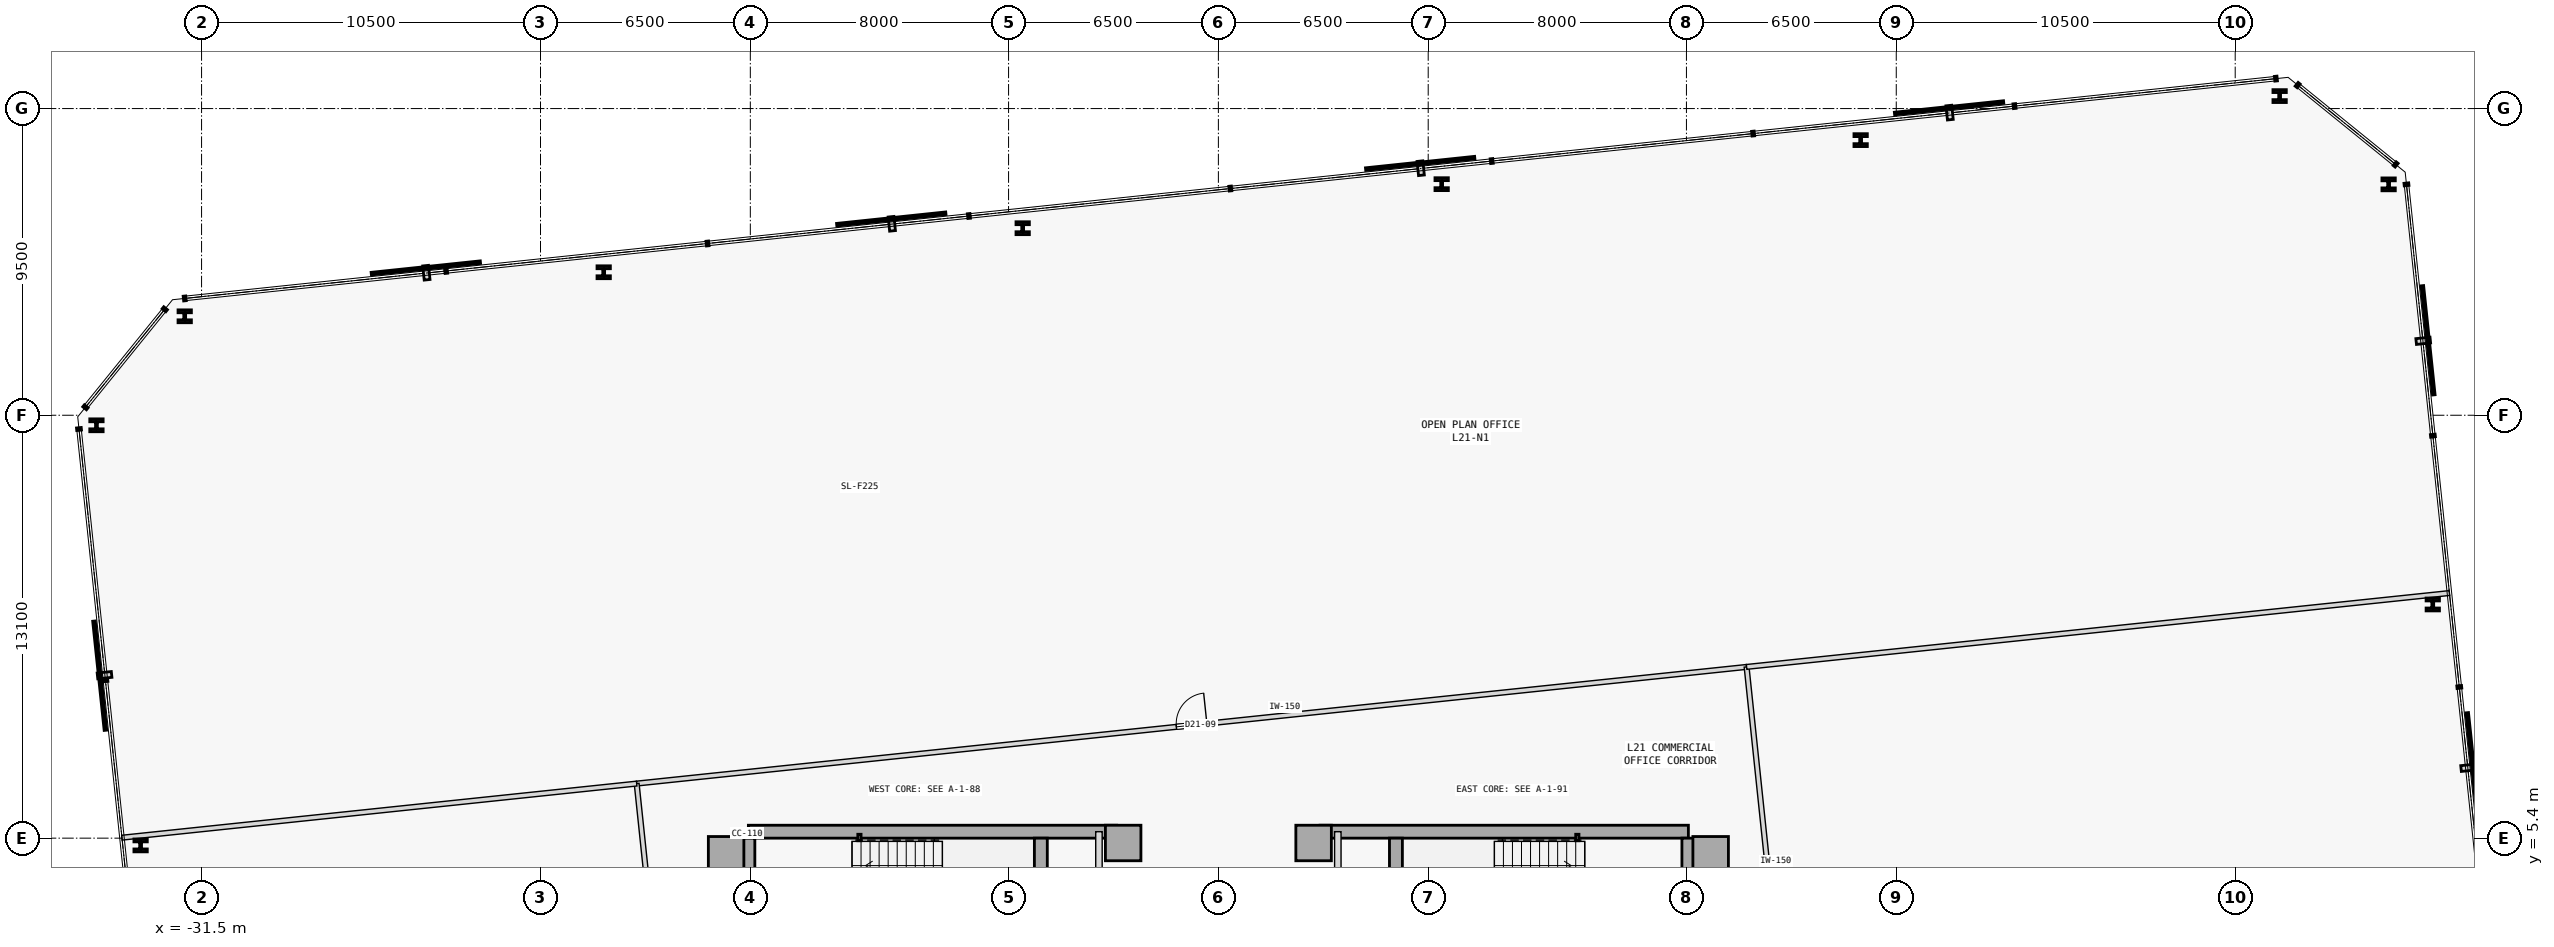
"""IFC4 building model, lengths in metres.
Left out: names, types, materials, properties, quantities, classifications, styles, units other than length and angle.
Written with IfcOpenShell. Run it as: python <this file> out.ifc"""

import sys

from ifc_helpers import new_model, si_unit, direction, frame, frame_2d, origin, origin_2d, place, context, subcontext, project, spatial, rectangle, hollow_rectangle, i_section, extrude, element, fill, save


model = new_model("IFC4")
c1 = context("Model", 3, precision=1e-05, world=origin(), true_north=direction((0.0, 1.0)))
c2 = subcontext(c1, "Body", "Model", "MODEL_VIEW")
j1 = project(units=[si_unit("LENGTHUNIT", "METRE"), si_unit("PLANEANGLEUNIT", "RADIAN")], contexts=[c1])
p1 = place(None, origin())
s1 = spatial("IfcSite", under=j1, at=p1, CompositionType="ELEMENT")
p2 = place(p1, origin())
s2 = spatial("IfcBuilding", under=s1, at=p2, CompositionType="ELEMENT")
p3 = place(p2, frame((0.0, 0.0, 87.4)))
s3 = spatial("IfcBuildingStorey", under=s2, at=p3, CompositionType="ELEMENT", Elevation=87.4)
for number, where, z_axis, x_axis in (
    (1, (-15.25, 4.9, 0.0), (0.0, 0.0, 1.0), (1.0, 0.0, 0.0)),
    (2, (-2.95, 5.25, 0.0), (0.0, 0.0, 1.0), (1.0, 0.0, 0.0)),
    (3, (15.25, 4.9, 0.0), (0.0, 0.0, 1.0), (1.0, 0.0, 0.0)),
    (4, (2.95, 5.25, 0.0), (0.0, 0.0, 1.0), (1.0, 0.0, 0.0)),
):
    element("IfcColumn", number, at=place(p3, frame(where, z_axis=z_axis, x_axis=x_axis)), inside=s3, PredefinedType="COLUMN", context=c2, shape_type="SweptSolid", body=[
        extrude(rectangle(XDim=1.1, YDim=1.1, at=origin_2d()), origin(), (0.0, 0.0, 1.0), 3.7),
    ])
p4 = place(p3, frame((-14.56, 5.6, 0.0), z_axis=(0.0, 0.0, 1.0), x_axis=(1.0, 0.0, 0.0)))
e5 = element("IfcWall", 5, at=p4, inside=s3, PredefinedType="SHEAR", context=c2, shape_type="SweptSolid", body=[
    extrude(rectangle(XDim=11.41, YDim=0.4, at=frame_2d((5.705, 0.0))), origin(), (0.0, 0.0, 1.0), 3.475),
])
p5 = place(p3, frame((-14.56, -5.4, 0.0), z_axis=(0.0, 0.0, 1.0), x_axis=(0.0, 1.0, 0.0)))
e6 = element("IfcWall", 6, at=p5, inside=s3, PredefinedType="SHEAR", context=c2, shape_type="SweptSolid", body=[
    extrude(rectangle(XDim=10.8, YDim=0.4, at=frame_2d((5.4, 0.0))), origin(), (0.0, 0.0, 1.0), 3.475),
])
p6 = place(p3, frame((-5.5, 2.15, 0.0), z_axis=(0.0, 0.0, 1.0), x_axis=(0.0, 1.0, 0.0)))
e7 = element("IfcWall", 7, at=p6, inside=s3, PredefinedType="SHEAR", context=c2, shape_type="SweptSolid", body=[
    extrude(rectangle(XDim=3.25, YDim=0.4, at=frame_2d((1.625, 0.0))), origin(), (0.0, 0.0, 1.0), 3.475),
])
p7 = place(p3, frame((3.15, 5.6, 0.0), z_axis=(0.0, 0.0, 1.0), x_axis=(1.0, 0.0, 0.0)))
e8 = element("IfcWall", 8, at=p7, inside=s3, PredefinedType="SHEAR", context=c2, shape_type="SweptSolid", body=[
    extrude(rectangle(XDim=11.41, YDim=0.4, at=frame_2d((5.705, 0.0))), origin(), (0.0, 0.0, 1.0), 3.475),
])
p8 = place(p3, frame((14.56, -5.4, 0.0), z_axis=(0.0, 0.0, 1.0), x_axis=(0.0, 1.0, 0.0)))
e9 = element("IfcWall", 9, at=p8, inside=s3, PredefinedType="SHEAR", context=c2, shape_type="SweptSolid", body=[
    extrude(rectangle(XDim=10.8, YDim=0.4, at=frame_2d((5.4, 0.0))), origin(), (0.0, 0.0, 1.0), 3.475),
])
p9 = place(p3, frame((5.5, 2.15, 0.0), z_axis=(0.0, 0.0, 1.0), x_axis=(0.0, 1.0, 0.0)))
e10 = element("IfcWall", 10, at=p9, inside=s3, PredefinedType="SHEAR", context=c2, shape_type="SweptSolid", body=[
    extrude(rectangle(XDim=3.25, YDim=0.4, at=frame_2d((1.625, 0.0))), origin(), (0.0, 0.0, 1.0), 3.475),
])
for number, where, z_axis, x_axis in (
    (11, (-11.12, 5.42, 0.0), (0.0, 0.0, 1.0), (1.0, 0.0, 0.0)),
    (12, (11.12, 5.42, 0.0), (0.0, 0.0, 1.0), (1.0, 0.0, 0.0)),
):
    element("IfcColumn", number, at=place(p3, frame(where, z_axis=z_axis, x_axis=x_axis)), inside=s3, PredefinedType="COLUMN", context=c2, shape_type="SweptSolid", body=[
        extrude(hollow_rectangle(XDim=0.1, YDim=0.2, WallThickness=0.008, at=origin_2d()), origin(), (0.0, 0.0, 1.0), 3.7),
    ])
for number, where, z_axis, x_axis in (
    (13, (37.621, 12.638, 0.0), (0.0, 0.0, 1.0), (1.0, 0.0, 0.0)),
    (14, (36.253, 25.652, 0.0), (0.0, 0.0, 1.0), (1.0, 0.0, 0.0)),
    (15, (32.876, 28.386, 0.0), (0.0, 0.0, 1.0), (1.0, 0.0, 0.0)),
    (16, (19.897, 27.022, 0.0), (0.0, 0.0, 1.0), (1.0, 0.0, 0.0)),
    (17, (6.917, 25.658, 0.0), (0.0, 0.0, 1.0), (1.0, 0.0, 0.0)),
    (18, (-6.062, 24.293, 0.0), (0.0, 0.0, 1.0), (1.0, 0.0, 0.0)),
    (19, (-19.042, 22.929, 0.0), (0.0, 0.0, 1.0), (1.0, 0.0, 0.0)),
    (20, (-32.022, 21.565, 0.0), (0.0, 0.0, 1.0), (1.0, 0.0, 0.0)),
    (21, (-34.756, 18.189, 0.0), (0.0, 0.0, 1.0), (1.0, 0.0, 0.0)),
    (22, (-33.388, 5.175, 0.0), (0.0, 0.0, 1.0), (1.0, 0.0, 0.0)),
):
    element("IfcColumn", number, at=place(p3, frame(where, z_axis=z_axis, x_axis=x_axis)), inside=s3, PredefinedType="COLUMN", context=c2, shape_type="SweptSolid", body=[
        extrude(i_section(OverallWidth=0.413, OverallDepth=0.398, WebThickness=0.056, FlangeThickness=0.089, FilletRadius=0.015, at=origin_2d()), origin(), (0.0, 0.0, 1.0), 3.7),
    ])
p10 = place(p3, frame((-3.7, -1.15, 0.0), z_axis=(0.0, 0.0, 1.0), x_axis=(0.0, 1.0, 0.0)))
e23 = element("IfcWall", 23, at=p10, inside=s3, PredefinedType="STANDARD", context=c2, shape_type="SweptSolid", body=[
    extrude(rectangle(XDim=6.75, YDim=0.2, at=frame_2d((3.375, 0.0))), origin(), (0.0, 0.0, 1.0), 3.475),
])
p11 = place(p10, frame((0.35, 0.0, 0.0)))
e24 = element("IfcOpeningElement", 24, at=p11, cuts=e23, PredefinedType="OPENING", context=c2, shape_type="SweptSolid", body=[
    extrude(rectangle(XDim=0.88, YDim=2.15, at=frame_2d((0.44, 1.075))), frame((0.0, 0.11, 0.0), z_axis=(0.0, -1.0, 0.0), x_axis=(1.0, 0.0, 0.0)), (0.0, 0.0, 1.0), 0.22),
])
p12 = place(p10, frame((2.55, 0.0, 0.0)))
e25 = element("IfcOpeningElement", 25, at=p12, cuts=e23, PredefinedType="OPENING", context=c2, shape_type="SweptSolid", body=[
    extrude(rectangle(XDim=0.92, YDim=2.15, at=frame_2d((0.46, 1.075))), frame((0.0, 0.11, 0.0), z_axis=(0.0, -1.0, 0.0), x_axis=(1.0, 0.0, 0.0)), (0.0, 0.0, 1.0), 0.22),
])
p13 = place(p10, frame((4.22, 0.0, 0.0)))
e26 = element("IfcOpeningElement", 26, at=p13, cuts=e23, PredefinedType="OPENING", context=c2, shape_type="SweptSolid", body=[
    extrude(rectangle(XDim=0.88, YDim=2.15, at=frame_2d((0.44, 1.075))), frame((0.0, 0.11, 0.0), z_axis=(0.0, -1.0, 0.0), x_axis=(1.0, 0.0, 0.0)), (0.0, 0.0, 1.0), 0.22),
])
p14 = place(p3, frame((3.7, -1.15, 0.0), z_axis=(0.0, 0.0, 1.0), x_axis=(0.0, 1.0, 0.0)))
e27 = element("IfcWall", 27, at=p14, inside=s3, PredefinedType="STANDARD", context=c2, shape_type="SweptSolid", body=[
    extrude(rectangle(XDim=6.75, YDim=0.2, at=frame_2d((3.375, 0.0))), origin(), (0.0, 0.0, 1.0), 3.475),
])
p15 = place(p14, frame((3.6, 0.0, 0.0)))
e28 = element("IfcOpeningElement", 28, at=p15, cuts=e27, PredefinedType="OPENING", context=c2, shape_type="SweptSolid", body=[
    extrude(rectangle(XDim=0.92, YDim=2.15, at=frame_2d((0.46, 1.075))), frame((0.0, 0.11, 0.0), z_axis=(0.0, -1.0, 0.0), x_axis=(1.0, 0.0, 0.0)), (0.0, 0.0, 1.0), 0.22),
])
p16 = place(p14, frame((0.85, 0.0, 0.0)))
e29 = element("IfcOpeningElement", 29, at=p16, cuts=e27, PredefinedType="OPENING", context=c2, shape_type="SweptSolid", body=[
    extrude(rectangle(XDim=0.9, YDim=2.15, at=frame_2d((0.45, 1.075))), frame((0.0, 0.11, 0.0), z_axis=(0.0, -1.0, 0.0), x_axis=(1.0, 0.0, 0.0)), (0.0, 0.0, 1.0), 0.22),
])
p17 = place(p3, frame((-18.021, 7.09, 0.0), z_axis=(0.0, 0.0, 1.0), x_axis=(0.994522464549, 0.104523047737, 0.0)))
e30 = element("IfcWall", 30, at=p17, inside=s3, PredefinedType="PARTITIONING", context=c2, shape_type="SweptSolid", body=[
    extrude(rectangle(XDim=34.574, YDim=0.15, at=frame_2d((17.287, 0.0))), origin(), (0.0, 0.0, 1.0), 3.475),
])
p18 = place(p17, frame((16.812, 0.0, 0.0)))
e31 = element("IfcOpeningElement", 31, at=p18, cuts=e30, PredefinedType="OPENING", context=c2, shape_type="SweptSolid", body=[
    extrude(rectangle(XDim=0.95, YDim=2.15, at=frame_2d((0.475, 1.075))), frame((0.0, 0.085, 0.0), z_axis=(0.0, -1.0, 0.0), x_axis=(1.0, 0.0, 0.0)), (0.0, 0.0, 1.0), 0.17),
])
p19 = place(p3, frame((-16.153, -10.682, 0.0), z_axis=(0.0, 0.0, 1.0), x_axis=(-0.104527614588, 0.994521984568, 0.0)))
e32 = element("IfcWall", 32, at=p19, inside=s3, PredefinedType="PARTITIONING", context=c2, shape_type="SweptSolid", body=[
    extrude(rectangle(XDim=17.87, YDim=0.15, at=frame_2d((8.935, 0.0))), origin(), (0.0, 0.0, 1.0), 3.475),
])
p20 = place(p19, frame((8.46, 0.0, 0.0)))
e33 = element("IfcOpeningElement", 33, at=p20, cuts=e32, PredefinedType="OPENING", context=c2, shape_type="SweptSolid", body=[
    extrude(rectangle(XDim=0.95, YDim=2.15, at=frame_2d((0.475, 1.075))), frame((0.0, 0.085, 0.0), z_axis=(0.0, -1.0, 0.0), x_axis=(1.0, 0.0, 0.0)), (0.0, 0.0, 1.0), 0.17),
])
p21 = place(p3, frame((18.231, -7.068, 0.0), z_axis=(0.0, 0.0, 1.0), x_axis=(-0.104529034836, 0.994521835294, 0.0)))
e34 = element("IfcWall", 34, at=p21, inside=s3, PredefinedType="PARTITIONING", context=c2, shape_type="SweptSolid", body=[
    extrude(rectangle(XDim=17.87, YDim=0.15, at=frame_2d((8.935, 0.0))), origin(), (0.0, 0.0, 1.0), 3.475),
])
p22 = place(p21, frame((8.46, 0.0, 0.0)))
e35 = element("IfcOpeningElement", 35, at=p22, cuts=e34, PredefinedType="OPENING", context=c2, shape_type="SweptSolid", body=[
    extrude(rectangle(XDim=0.95, YDim=2.15, at=frame_2d((0.475, 1.075))), frame((0.0, 0.085, 0.0), z_axis=(0.0, -1.0, 0.0), x_axis=(1.0, 0.0, 0.0)), (0.0, 0.0, 1.0), 0.17),
])
p23 = place(p3, frame((-33.967, 5.414, 0.0), z_axis=(0.0, 0.0, 1.0), x_axis=(0.994521211213, 0.104534972363, 0.0)))
e36 = element("IfcWall", 36, at=p23, inside=s3, PredefinedType="PARTITIONING", context=c2, shape_type="SweptSolid", body=[
    extrude(rectangle(XDim=16.033, YDim=0.15, at=frame_2d((8.017, 0.0))), origin(), (0.0, 0.0, 1.0), 3.475),
])
p24 = place(p3, frame((16.363, 10.704, 0.0), z_axis=(0.0, 0.0, 1.0), x_axis=(0.994521206634, 0.104535015934, 0.0)))
e37 = element("IfcWall", 37, at=p24, inside=s3, PredefinedType="PARTITIONING", context=c2, shape_type="SweptSolid", body=[
    extrude(rectangle(XDim=21.893, YDim=0.15, at=frame_2d((10.946, 0.0))), origin(), (0.0, 0.0, 1.0), 3.475),
])
p25 = place(p18, origin())
e38 = element("IfcDoor", 38, at=p25, inside=s3, OperationType="SINGLE_SWING_RIGHT", PredefinedType="DOOR", context=c2, shape_type="SweptSolid", body=[
    extrude(rectangle(XDim=0.95, YDim=2.15, at=frame_2d((0.475, 1.075))), frame((0.0, 0.025, 0.0), z_axis=(0.0, -1.0, 0.0), x_axis=(1.0, 0.0, 0.0)), (0.0, 0.0, 1.0), 0.05),
])
fill(e31, e38)
save(model, sys.argv[1])
